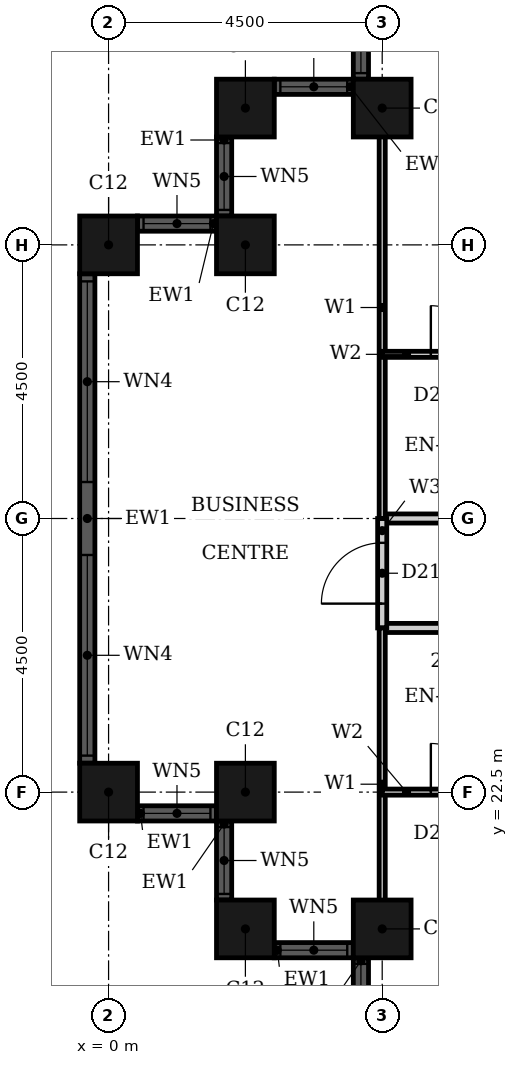
"""IFC4 building model, lengths in metres.
Left out: names, types, materials, properties, quantities, classifications, styles, units other than length and angle.
Written with IfcOpenShell. Run it as: python <this file> out.ifc"""

import sys

from ifc_helpers import new_model, si_unit, direction, frame, frame_2d, origin, origin_2d, place, context, subcontext, project, spatial, rectangle, hollow_rectangle, extrude, element, fill, save


model = new_model("IFC4")
c1 = context("Model", 3, precision=1e-05, world=origin(), true_north=direction((0.0, 1.0)))
c2 = subcontext(c1, "Body", "Model", "MODEL_VIEW")
j1 = project(units=[si_unit("LENGTHUNIT", "METRE"), si_unit("PLANEANGLEUNIT", "RADIAN")], contexts=[c1])
p1 = place(None, origin())
s1 = spatial("IfcSite", under=j1, at=p1, CompositionType="ELEMENT")
p2 = place(p1, origin())
s2 = spatial("IfcBuilding", under=s1, at=p2, CompositionType="ELEMENT")
p3 = place(p2, frame((0.0, 0.0, 88.8)))
s3 = spatial("IfcBuildingStorey", under=s2, at=p3, CompositionType="ELEMENT", Elevation=88.8)
for number, where, z_axis, x_axis in (
    (1, (4.5, 33.75, 0.0), (0.0, 0.0, 1.0), (1.0, 0.0, 0.0)),
    (2, (2.25, 33.75, 0.0), (0.0, 0.0, 1.0), (1.0, 0.0, 0.0)),
    (3, (2.25, 31.5, 0.0), (0.0, 0.0, 1.0), (1.0, 0.0, 0.0)),
    (4, (0.0, 31.5, 0.0), (0.0, 0.0, 1.0), (1.0, 0.0, 0.0)),
    (5, (0.0, 22.5, 0.0), (0.0, 0.0, 1.0), (1.0, 0.0, 0.0)),
    (6, (2.25, 22.5, 0.0), (0.0, 0.0, 1.0), (1.0, 0.0, 0.0)),
    (7, (2.25, 20.25, 0.0), (0.0, 0.0, 1.0), (1.0, 0.0, 0.0)),
    (8, (4.5, 20.25, 0.0), (0.0, 0.0, 1.0), (1.0, 0.0, 0.0)),
):
    element("IfcColumn", number, at=place(p3, frame(where, z_axis=z_axis, x_axis=x_axis)), inside=s3, PredefinedType="COLUMN", context=c2, shape_type="SweptSolid", body=[
        extrude(hollow_rectangle(XDim=0.95, YDim=0.95, WallThickness=0.03, at=origin_2d()), origin(), (0.0, 0.0, 1.0), 3.6),
    ])
p4 = place(p3, frame((4.15, 35.525, 0.0), z_axis=(0.0, 0.0, 1.0), x_axis=(0.0, -1.0, 0.0)))
e9 = element("IfcWall", 9, at=p4, inside=s3, PredefinedType="SOLIDWALL", context=c2, shape_type="SweptSolid", body=[
    extrude(rectangle(XDim=1.3, YDim=0.25, at=frame_2d((0.65, 0.0))), origin(), (0.0, 0.0, 1.0), 3.6),
])
p5 = place(p4, frame((0.1, 0.0, 0.9)))
e10 = element("IfcOpeningElement", 10, at=p5, cuts=e9, PredefinedType="OPENING", context=c2, shape_type="SweptSolid", body=[
    extrude(rectangle(XDim=1.1, YDim=2.08, at=frame_2d((0.55, 1.04))), frame((0.0, 0.135, 0.0), z_axis=(0.0, -1.0, 0.0), x_axis=(1.0, 0.0, 0.0)), (0.0, 0.0, 1.0), 0.27),
])
p6 = place(p3, frame((4.025, 34.1, 0.0), z_axis=(0.0, 0.0, 1.0), x_axis=(-1.0, 0.0, 0.0)))
e11 = element("IfcWall", 11, at=p6, inside=s3, PredefinedType="SOLIDWALL", context=c2, shape_type="SweptSolid", body=[
    extrude(rectangle(XDim=1.3, YDim=0.25, at=frame_2d((0.65, 0.0))), origin(), (0.0, 0.0, 1.0), 3.6),
])
p7 = place(p6, frame((0.1, 0.0, 0.9)))
e12 = element("IfcOpeningElement", 12, at=p7, cuts=e11, PredefinedType="OPENING", context=c2, shape_type="SweptSolid", body=[
    extrude(rectangle(XDim=1.1, YDim=2.08, at=frame_2d((0.55, 1.04))), frame((0.0, 0.135, 0.0), z_axis=(0.0, -1.0, 0.0), x_axis=(1.0, 0.0, 0.0)), (0.0, 0.0, 1.0), 0.27),
])
p8 = place(p3, frame((1.9, 33.275, 0.0), z_axis=(0.0, 0.0, 1.0), x_axis=(0.0, -1.0, 0.0)))
e13 = element("IfcWall", 13, at=p8, inside=s3, PredefinedType="SOLIDWALL", context=c2, shape_type="SweptSolid", body=[
    extrude(rectangle(XDim=1.3, YDim=0.25, at=frame_2d((0.65, 0.0))), origin(), (0.0, 0.0, 1.0), 3.6),
])
p9 = place(p8, frame((0.1, 0.0, 0.9)))
e14 = element("IfcOpeningElement", 14, at=p9, cuts=e13, PredefinedType="OPENING", context=c2, shape_type="SweptSolid", body=[
    extrude(rectangle(XDim=1.1, YDim=2.08, at=frame_2d((0.55, 1.04))), frame((0.0, 0.135, 0.0), z_axis=(0.0, -1.0, 0.0), x_axis=(1.0, 0.0, 0.0)), (0.0, 0.0, 1.0), 0.27),
])
p10 = place(p3, frame((1.775, 31.85, 0.0), z_axis=(0.0, 0.0, 1.0), x_axis=(-1.0, 0.0, 0.0)))
e15 = element("IfcWall", 15, at=p10, inside=s3, PredefinedType="SOLIDWALL", context=c2, shape_type="SweptSolid", body=[
    extrude(rectangle(XDim=1.3, YDim=0.25, at=frame_2d((0.65, 0.0))), origin(), (0.0, 0.0, 1.0), 3.6),
])
p11 = place(p10, frame((0.1, 0.0, 0.9)))
e16 = element("IfcOpeningElement", 16, at=p11, cuts=e15, PredefinedType="OPENING", context=c2, shape_type="SweptSolid", body=[
    extrude(rectangle(XDim=1.1, YDim=2.08, at=frame_2d((0.55, 1.04))), frame((0.0, 0.135, 0.0), z_axis=(0.0, -1.0, 0.0), x_axis=(1.0, 0.0, 0.0)), (0.0, 0.0, 1.0), 0.27),
])
p12 = place(p3, frame((-0.35, 31.025, 0.0), z_axis=(0.0, 0.0, 1.0), x_axis=(0.0, -1.0, 0.0)))
e17 = element("IfcWall", 17, at=p12, inside=s3, PredefinedType="SOLIDWALL", context=c2, shape_type="SweptSolid", body=[
    extrude(rectangle(XDim=8.05, YDim=0.25, at=frame_2d((4.025, 0.0))), origin(), (0.0, 0.0, 1.0), 3.6),
])
p13 = place(p12, frame((0.125, 0.0, 0.9)))
e18 = element("IfcOpeningElement", 18, at=p13, cuts=e17, PredefinedType="OPENING", context=c2, shape_type="SweptSolid", body=[
    extrude(rectangle(XDim=3.3, YDim=2.08, at=frame_2d((1.65, 1.04))), frame((0.0, 0.135, 0.0), z_axis=(0.0, -1.0, 0.0), x_axis=(1.0, 0.0, 0.0)), (0.0, 0.0, 1.0), 0.27),
])
p14 = place(p12, frame((4.625, 0.0, 0.9)))
e19 = element("IfcOpeningElement", 19, at=p14, cuts=e17, PredefinedType="OPENING", context=c2, shape_type="SweptSolid", body=[
    extrude(rectangle(XDim=3.3, YDim=2.08, at=frame_2d((1.65, 1.04))), frame((0.0, 0.135, 0.0), z_axis=(0.0, -1.0, 0.0), x_axis=(1.0, 0.0, 0.0)), (0.0, 0.0, 1.0), 0.27),
])
p15 = place(p3, frame((0.475, 22.15, 0.0), z_axis=(0.0, 0.0, 1.0), x_axis=(1.0, 0.0, 0.0)))
e20 = element("IfcWall", 20, at=p15, inside=s3, PredefinedType="SOLIDWALL", context=c2, shape_type="SweptSolid", body=[
    extrude(rectangle(XDim=1.3, YDim=0.25, at=frame_2d((0.65, 0.0))), origin(), (0.0, 0.0, 1.0), 3.6),
])
p16 = place(p15, frame((0.1, 0.0, 0.9)))
e21 = element("IfcOpeningElement", 21, at=p16, cuts=e20, PredefinedType="OPENING", context=c2, shape_type="SweptSolid", body=[
    extrude(rectangle(XDim=1.1, YDim=2.08, at=frame_2d((0.55, 1.04))), frame((0.0, 0.135, 0.0), z_axis=(0.0, -1.0, 0.0), x_axis=(1.0, 0.0, 0.0)), (0.0, 0.0, 1.0), 0.27),
])
p17 = place(p3, frame((1.9, 22.025, 0.0), z_axis=(0.0, 0.0, 1.0), x_axis=(0.0, -1.0, 0.0)))
e22 = element("IfcWall", 22, at=p17, inside=s3, PredefinedType="SOLIDWALL", context=c2, shape_type="SweptSolid", body=[
    extrude(rectangle(XDim=1.3, YDim=0.25, at=frame_2d((0.65, 0.0))), origin(), (0.0, 0.0, 1.0), 3.6),
])
p18 = place(p17, frame((0.1, 0.0, 0.9)))
e23 = element("IfcOpeningElement", 23, at=p18, cuts=e22, PredefinedType="OPENING", context=c2, shape_type="SweptSolid", body=[
    extrude(rectangle(XDim=1.1, YDim=2.08, at=frame_2d((0.55, 1.04))), frame((0.0, 0.135, 0.0), z_axis=(0.0, -1.0, 0.0), x_axis=(1.0, 0.0, 0.0)), (0.0, 0.0, 1.0), 0.27),
])
p19 = place(p3, frame((2.725, 19.9, 0.0), z_axis=(0.0, 0.0, 1.0), x_axis=(1.0, 0.0, 0.0)))
e24 = element("IfcWall", 24, at=p19, inside=s3, PredefinedType="SOLIDWALL", context=c2, shape_type="SweptSolid", body=[
    extrude(rectangle(XDim=1.3, YDim=0.25, at=frame_2d((0.65, 0.0))), origin(), (0.0, 0.0, 1.0), 3.6),
])
p20 = place(p19, frame((0.1, 0.0, 0.9)))
e25 = element("IfcOpeningElement", 25, at=p20, cuts=e24, PredefinedType="OPENING", context=c2, shape_type="SweptSolid", body=[
    extrude(rectangle(XDim=1.1, YDim=2.08, at=frame_2d((0.55, 1.04))), frame((0.0, 0.135, 0.0), z_axis=(0.0, -1.0, 0.0), x_axis=(1.0, 0.0, 0.0)), (0.0, 0.0, 1.0), 0.27),
])
p21 = place(p3, frame((4.15, 19.775, 0.0), z_axis=(0.0, 0.0, 1.0), x_axis=(0.0, -1.0, 0.0)))
e26 = element("IfcWall", 26, at=p21, inside=s3, PredefinedType="SOLIDWALL", context=c2, shape_type="SweptSolid", body=[
    extrude(rectangle(XDim=1.3, YDim=0.25, at=frame_2d((0.65, 0.0))), origin(), (0.0, 0.0, 1.0), 3.6),
])
p22 = place(p21, frame((0.1, 0.0, 0.9)))
e27 = element("IfcOpeningElement", 27, at=p22, cuts=e26, PredefinedType="OPENING", context=c2, shape_type="SweptSolid", body=[
    extrude(rectangle(XDim=1.1, YDim=2.08, at=frame_2d((0.55, 1.04))), frame((0.0, 0.135, 0.0), z_axis=(0.0, -1.0, 0.0), x_axis=(1.0, 0.0, 0.0)), (0.0, 0.0, 1.0), 0.27),
])
p23 = place(p3, frame((4.5, 25.2, 0.0), z_axis=(0.0, 0.0, 1.0), x_axis=(1.0, 0.0, 0.0)))
e28 = element("IfcWall", 28, at=p23, inside=s3, PredefinedType="PARTITIONING", context=c2, shape_type="SweptSolid", body=[
    extrude(rectangle(XDim=11.7, YDim=0.15, at=frame_2d((5.85, 0.0))), origin(), (0.0, 0.0, 1.0), 3.3),
])
p24 = place(p23, frame((6.25, 0.0, 0.0)))
e29 = element("IfcOpeningElement", 29, at=p24, cuts=e28, PredefinedType="OPENING", context=c2, shape_type="SweptSolid", body=[
    extrude(rectangle(XDim=1.0, YDim=2.1, at=frame_2d((0.5, 1.05))), frame((0.0, 0.085, 0.0), z_axis=(0.0, -1.0, 0.0), x_axis=(1.0, 0.0, 0.0)), (0.0, 0.0, 1.0), 0.17),
])
p25 = place(p3, frame((4.5, 27.0, 0.0), z_axis=(0.0, 0.0, 1.0), x_axis=(1.0, 0.0, 0.0)))
e30 = element("IfcWall", 30, at=p25, inside=s3, PredefinedType="PARTITIONING", context=c2, shape_type="SweptSolid", body=[
    extrude(rectangle(XDim=11.7, YDim=0.15, at=frame_2d((5.85, 0.0))), origin(), (0.0, 0.0, 1.0), 2.58),
])
p26 = place(p25, frame((6.25, 0.0, 0.0)))
e31 = element("IfcOpeningElement", 31, at=p26, cuts=e30, PredefinedType="OPENING", context=c2, shape_type="SweptSolid", body=[
    extrude(rectangle(XDim=1.0, YDim=2.1, at=frame_2d((0.5, 1.05))), frame((0.0, 0.085, 0.0), z_axis=(0.0, -1.0, 0.0), x_axis=(1.0, 0.0, 0.0)), (0.0, 0.0, 1.0), 0.17),
])
p27 = place(p3, frame((4.5, 25.2, 0.0), z_axis=(0.0, 0.0, 1.0), x_axis=(0.0, 1.0, 0.0)))
e32 = element("IfcWall", 32, at=p27, inside=s3, PredefinedType="PARTITIONING", context=c2, shape_type="SweptSolid", body=[
    extrude(rectangle(XDim=1.8, YDim=0.15, at=frame_2d((0.9, 0.0))), origin(), (0.0, 0.0, 1.0), 3.3),
])
p28 = place(p27, frame((0.4, 0.0, 0.0)))
e33 = element("IfcOpeningElement", 33, at=p28, cuts=e32, PredefinedType="OPENING", context=c2, shape_type="SweptSolid", body=[
    extrude(rectangle(XDim=1.0, YDim=2.1, at=frame_2d((0.5, 1.05))), frame((0.0, 0.085, 0.0), z_axis=(0.0, -1.0, 0.0), x_axis=(1.0, 0.0, 0.0)), (0.0, 0.0, 1.0), 0.17),
])
p29 = place(p3, frame((4.5, 27.0, 0.0), z_axis=(0.0, 0.0, 1.0), x_axis=(0.0, 1.0, 0.0)))
e34 = element("IfcWall", 34, at=p29, inside=s3, PredefinedType="PARTITIONING", context=c2, shape_type="SweptSolid", body=[
    extrude(rectangle(XDim=6.94, YDim=0.1, at=frame_2d((3.47, 0.0))), origin(), (0.0, 0.0, 1.0), 3.3),
])
p30 = place(p3, frame((4.5, 20.06, 0.0), z_axis=(0.0, 0.0, 1.0), x_axis=(0.0, 1.0, 0.0)))
e35 = element("IfcWall", 35, at=p30, inside=s3, PredefinedType="PARTITIONING", context=c2, shape_type="SweptSolid", body=[
    extrude(rectangle(XDim=5.14, YDim=0.1, at=frame_2d((2.57, 0.0))), origin(), (0.0, 0.0, 1.0), 3.3),
])
p31 = place(p3, frame((4.5, 22.5, 0.0), z_axis=(0.0, 0.0, 1.0), x_axis=(1.0, 0.0, 0.0)))
e36 = element("IfcWall", 36, at=p31, inside=s3, PredefinedType="PARTITIONING", context=c2, shape_type="SweptSolid", body=[
    extrude(rectangle(XDim=2.4, YDim=0.1, at=frame_2d((1.2, 0.0))), origin(), (0.0, 0.0, 1.0), 2.58),
])
p32 = place(p31, frame((0.8, 0.0, 0.0)))
e37 = element("IfcOpeningElement", 37, at=p32, cuts=e36, PredefinedType="OPENING", context=c2, shape_type="SweptSolid", body=[
    extrude(rectangle(XDim=0.8, YDim=2.1, at=frame_2d((0.4, 1.05))), frame((0.0, 0.06, 0.0), z_axis=(0.0, -1.0, 0.0), x_axis=(1.0, 0.0, 0.0)), (0.0, 0.0, 1.0), 0.12),
])
p33 = place(p3, frame((4.5, 29.7, 0.0), z_axis=(0.0, 0.0, 1.0), x_axis=(1.0, 0.0, 0.0)))
e38 = element("IfcWall", 38, at=p33, inside=s3, PredefinedType="PARTITIONING", context=c2, shape_type="SweptSolid", body=[
    extrude(rectangle(XDim=2.4, YDim=0.1, at=frame_2d((1.2, 0.0))), origin(), (0.0, 0.0, 1.0), 3.3),
])
p34 = place(p33, frame((0.8, 0.0, 0.0)))
e39 = element("IfcOpeningElement", 39, at=p34, cuts=e38, PredefinedType="OPENING", context=c2, shape_type="SweptSolid", body=[
    extrude(rectangle(XDim=0.8, YDim=2.1, at=frame_2d((0.4, 1.05))), frame((0.0, 0.06, 0.0), z_axis=(0.0, -1.0, 0.0), x_axis=(1.0, 0.0, 0.0)), (0.0, 0.0, 1.0), 0.12),
])
p35 = place(p5, origin())
e40 = element("IfcWindow", 40, at=p35, inside=s3, PartitioningType="SINGLE_PANEL", PredefinedType="WINDOW", context=c2, shape_type="SweptSolid", body=[
    extrude(rectangle(XDim=1.1, YDim=2.08, at=frame_2d((0.55, 1.04))), frame((0.0, 0.03, 0.0), z_axis=(0.0, -1.0, 0.0), x_axis=(1.0, 0.0, 0.0)), (0.0, 0.0, 1.0), 0.06),
])
fill(e10, e40)
p36 = place(p7, origin())
e41 = element("IfcWindow", 41, at=p36, inside=s3, PartitioningType="SINGLE_PANEL", PredefinedType="WINDOW", context=c2, shape_type="SweptSolid", body=[
    extrude(rectangle(XDim=1.1, YDim=2.08, at=frame_2d((0.55, 1.04))), frame((0.0, 0.03, 0.0), z_axis=(0.0, -1.0, 0.0), x_axis=(1.0, 0.0, 0.0)), (0.0, 0.0, 1.0), 0.06),
])
fill(e12, e41)
p37 = place(p9, origin())
e42 = element("IfcWindow", 42, at=p37, inside=s3, PartitioningType="SINGLE_PANEL", PredefinedType="WINDOW", context=c2, shape_type="SweptSolid", body=[
    extrude(rectangle(XDim=1.1, YDim=2.08, at=frame_2d((0.55, 1.04))), frame((0.0, 0.03, 0.0), z_axis=(0.0, -1.0, 0.0), x_axis=(1.0, 0.0, 0.0)), (0.0, 0.0, 1.0), 0.06),
])
fill(e14, e42)
p38 = place(p11, origin())
e43 = element("IfcWindow", 43, at=p38, inside=s3, PartitioningType="SINGLE_PANEL", PredefinedType="WINDOW", context=c2, shape_type="SweptSolid", body=[
    extrude(rectangle(XDim=1.1, YDim=2.08, at=frame_2d((0.55, 1.04))), frame((0.0, 0.03, 0.0), z_axis=(0.0, -1.0, 0.0), x_axis=(1.0, 0.0, 0.0)), (0.0, 0.0, 1.0), 0.06),
])
fill(e16, e43)
p39 = place(p13, origin())
e44 = element("IfcWindow", 44, at=p39, inside=s3, PartitioningType="SINGLE_PANEL", PredefinedType="WINDOW", context=c2, shape_type="SweptSolid", body=[
    extrude(rectangle(XDim=3.3, YDim=2.08, at=frame_2d((1.65, 1.04))), frame((0.0, 0.03, 0.0), z_axis=(0.0, -1.0, 0.0), x_axis=(1.0, 0.0, 0.0)), (0.0, 0.0, 1.0), 0.06),
])
fill(e18, e44)
p40 = place(p14, origin())
e45 = element("IfcWindow", 45, at=p40, inside=s3, PartitioningType="SINGLE_PANEL", PredefinedType="WINDOW", context=c2, shape_type="SweptSolid", body=[
    extrude(rectangle(XDim=3.3, YDim=2.08, at=frame_2d((1.65, 1.04))), frame((0.0, 0.03, 0.0), z_axis=(0.0, -1.0, 0.0), x_axis=(1.0, 0.0, 0.0)), (0.0, 0.0, 1.0), 0.06),
])
fill(e19, e45)
p41 = place(p16, origin())
e46 = element("IfcWindow", 46, at=p41, inside=s3, PartitioningType="SINGLE_PANEL", PredefinedType="WINDOW", context=c2, shape_type="SweptSolid", body=[
    extrude(rectangle(XDim=1.1, YDim=2.08, at=frame_2d((0.55, 1.04))), frame((0.0, 0.03, 0.0), z_axis=(0.0, -1.0, 0.0), x_axis=(1.0, 0.0, 0.0)), (0.0, 0.0, 1.0), 0.06),
])
fill(e21, e46)
p42 = place(p18, origin())
e47 = element("IfcWindow", 47, at=p42, inside=s3, PartitioningType="SINGLE_PANEL", PredefinedType="WINDOW", context=c2, shape_type="SweptSolid", body=[
    extrude(rectangle(XDim=1.1, YDim=2.08, at=frame_2d((0.55, 1.04))), frame((0.0, 0.03, 0.0), z_axis=(0.0, -1.0, 0.0), x_axis=(1.0, 0.0, 0.0)), (0.0, 0.0, 1.0), 0.06),
])
fill(e23, e47)
p43 = place(p20, origin())
e48 = element("IfcWindow", 48, at=p43, inside=s3, PartitioningType="SINGLE_PANEL", PredefinedType="WINDOW", context=c2, shape_type="SweptSolid", body=[
    extrude(rectangle(XDim=1.1, YDim=2.08, at=frame_2d((0.55, 1.04))), frame((0.0, 0.03, 0.0), z_axis=(0.0, -1.0, 0.0), x_axis=(1.0, 0.0, 0.0)), (0.0, 0.0, 1.0), 0.06),
])
fill(e25, e48)
p44 = place(p22, origin())
e49 = element("IfcWindow", 49, at=p44, inside=s3, PartitioningType="SINGLE_PANEL", PredefinedType="WINDOW", context=c2, shape_type="SweptSolid", body=[
    extrude(rectangle(XDim=1.1, YDim=2.08, at=frame_2d((0.55, 1.04))), frame((0.0, 0.03, 0.0), z_axis=(0.0, -1.0, 0.0), x_axis=(1.0, 0.0, 0.0)), (0.0, 0.0, 1.0), 0.06),
])
fill(e27, e49)
p45 = place(p32, origin())
e50 = element("IfcDoor", 50, at=p45, inside=s3, OperationType="SINGLE_SWING_RIGHT", PredefinedType="DOOR", context=c2, shape_type="SweptSolid", body=[
    extrude(rectangle(XDim=0.8, YDim=2.1, at=frame_2d((0.4, 1.05))), frame((0.0, 0.025, 0.0), z_axis=(0.0, -1.0, 0.0), x_axis=(1.0, 0.0, 0.0)), (0.0, 0.0, 1.0), 0.05),
])
fill(e37, e50)
p46 = place(p34, origin())
e51 = element("IfcDoor", 51, at=p46, inside=s3, OperationType="SINGLE_SWING_RIGHT", PredefinedType="DOOR", context=c2, shape_type="SweptSolid", body=[
    extrude(rectangle(XDim=0.8, YDim=2.1, at=frame_2d((0.4, 1.05))), frame((0.0, 0.025, 0.0), z_axis=(0.0, -1.0, 0.0), x_axis=(1.0, 0.0, 0.0)), (0.0, 0.0, 1.0), 0.05),
])
fill(e39, e51)
p47 = place(p28, origin())
e52 = element("IfcDoor", 52, at=p47, inside=s3, OperationType="SINGLE_SWING_LEFT", PredefinedType="DOOR", context=c2, shape_type="SweptSolid", body=[
    extrude(rectangle(XDim=1.0, YDim=2.1, at=frame_2d((0.5, 1.05))), frame((0.0, 0.025, 0.0), z_axis=(0.0, -1.0, 0.0), x_axis=(1.0, 0.0, 0.0)), (0.0, 0.0, 1.0), 0.05),
])
fill(e33, e52)
save(model, sys.argv[1])
